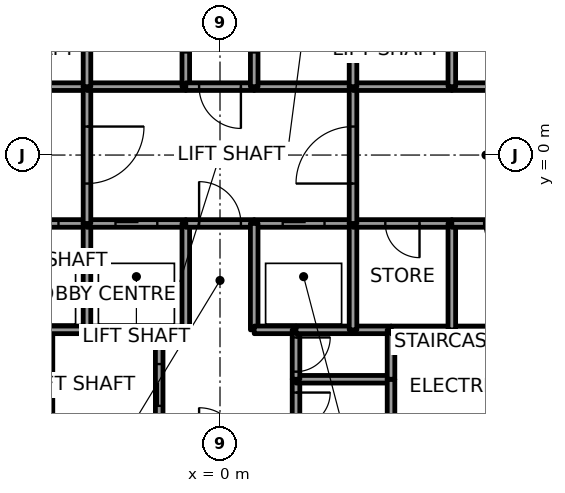
"""IFC4 building model, lengths in metres.
Left out: names, types, materials, properties, quantities, classifications, styles, units other than length and angle.
Written with IfcOpenShell. Run it as: python <this file> out.ifc"""

import sys

from ifc_helpers import new_model, si_unit, direction, frame, frame_2d, origin, place, context, subcontext, project, spatial, rectangle, extrude, element, fill, save


model = new_model("IFC4")
c1 = context("Model", 3, precision=1e-05, world=origin(), true_north=direction((0.0, 1.0)))
c2 = subcontext(c1, "Body", "Model", "MODEL_VIEW")
j1 = project(units=[si_unit("LENGTHUNIT", "METRE"), si_unit("PLANEANGLEUNIT", "RADIAN")], contexts=[c1])
p1 = place(None, origin())
s1 = spatial("IfcSite", under=j1, at=p1, CompositionType="ELEMENT")
p2 = place(p1, origin())
s2 = spatial("IfcBuilding", under=s1, at=p2, CompositionType="ELEMENT")
p3 = place(p2, frame((0.0, 0.0, 28.8)))
s3 = spatial("IfcBuildingStorey", under=s2, at=p3, CompositionType="ELEMENT", Elevation=28.8)
p4 = place(p3, frame((-6.1, -1.8, 0.0), z_axis=(0.0, 0.0, 1.0), x_axis=(1.0, 0.0, 0.0)))
e1 = element("IfcWall", 1, at=p4, inside=s3, PredefinedType="SOLIDWALL", context=c2, shape_type="SweptSolid", body=[
    extrude(rectangle(XDim=2.6, YDim=0.2, at=frame_2d((1.3, 0.0))), origin(), (0.0, 0.0, 1.0), 5.0),
])
p5 = place(p4, frame((0.75, 0.0, 0.0)))
e2 = element("IfcOpeningElement", 2, at=p5, cuts=e1, PredefinedType="OPENING", context=c2, shape_type="SweptSolid", body=[
    extrude(rectangle(XDim=1.1, YDim=2.1, at=frame_2d((0.55, 1.05))), frame((0.0, 0.1, 0.0), z_axis=(0.0, -1.0, 0.0), x_axis=(1.0, 0.0, 0.0)), (0.0, 0.0, 1.0), 0.2),
])
p6 = place(p3, frame((-3.5, 1.8, 0.0), z_axis=(0.0, 0.0, 1.0), x_axis=(-1.0, 0.0, 0.0)))
e3 = element("IfcWall", 3, at=p6, inside=s3, PredefinedType="SOLIDWALL", context=c2, shape_type="SweptSolid", body=[
    extrude(rectangle(XDim=2.6, YDim=0.2, at=frame_2d((1.3, 0.0))), origin(), (0.0, 0.0, 1.0), 5.0),
])
p7 = place(p3, frame((-4.5, -4.6, 0.0), z_axis=(0.0, 0.0, 1.0), x_axis=(1.0, 0.0, 0.0)))
e4 = element("IfcWall", 4, at=p7, inside=s3, PredefinedType="SOLIDWALL", context=c2, shape_type="SweptSolid", body=[
    extrude(rectangle(XDim=1.0, YDim=0.2, at=frame_2d((0.5, 0.0))), origin(), (0.0, 0.0, 1.0), 5.0),
])
p8 = place(p3, frame((-3.5, -4.6, 0.0), z_axis=(0.0, 0.0, 1.0), x_axis=(1.0, 0.0, 0.0)))
e5 = element("IfcWall", 5, at=p8, inside=s3, PredefinedType="SOLIDWALL", context=c2, shape_type="SweptSolid", body=[
    extrude(rectangle(XDim=1.9, YDim=0.2, at=frame_2d((0.95, 0.0))), origin(), (0.0, 0.0, 1.0), 5.0),
])
p9 = place(p3, frame((-3.5, -4.6, 0.0), z_axis=(0.0, 0.0, 1.0), x_axis=(0.0, 1.0, 0.0)))
e6 = element("IfcWall", 6, at=p9, inside=s3, PredefinedType="SOLIDWALL", context=c2, shape_type="SweptSolid", body=[
    extrude(rectangle(XDim=2.8, YDim=0.2, at=frame_2d((1.4, 0.0))), origin(), (0.0, 0.0, 1.0), 5.0),
])
p10 = place(p3, frame((-3.5, -1.8, 0.0), z_axis=(0.0, 0.0, 1.0), x_axis=(1.0, 0.0, 0.0)))
e7 = element("IfcWall", 7, at=p10, inside=s3, PredefinedType="SOLIDWALL", context=c2, shape_type="SweptSolid", body=[
    extrude(rectangle(XDim=2.6, YDim=0.2, at=frame_2d((1.3, 0.0))), origin(), (0.0, 0.0, 1.0), 5.0),
])
p11 = place(p10, frame((0.75, 0.0, 0.0)))
e8 = element("IfcOpeningElement", 8, at=p11, cuts=e7, PredefinedType="OPENING", context=c2, shape_type="SweptSolid", body=[
    extrude(rectangle(XDim=1.1, YDim=2.1, at=frame_2d((0.55, 1.05))), frame((0.0, 0.1, 0.0), z_axis=(0.0, -1.0, 0.0), x_axis=(1.0, 0.0, 0.0)), (0.0, 0.0, 1.0), 0.2),
])
p12 = place(p3, frame((-3.5, 1.8, 0.0), z_axis=(0.0, 0.0, 1.0), x_axis=(0.0, -1.0, 0.0)))
e9 = element("IfcWall", 9, at=p12, inside=s3, PredefinedType="SOLIDWALL", context=c2, shape_type="SweptSolid", body=[
    extrude(rectangle(XDim=3.6, YDim=0.2, at=frame_2d((1.8, 0.0))), origin(), (0.0, 0.0, 1.0), 5.0),
])
p13 = place(p12, frame((1.05, 0.0, 0.0)))
e10 = element("IfcOpeningElement", 10, at=p13, cuts=e9, PredefinedType="OPENING", context=c2, shape_type="SweptSolid", body=[
    extrude(rectangle(XDim=1.5, YDim=2.4, at=frame_2d((0.75, 1.2))), frame((0.0, 0.1, 0.0), z_axis=(0.0, -1.0, 0.0), x_axis=(1.0, 0.0, 0.0)), (0.0, 0.0, 1.0), 0.2),
])
p14 = place(p3, frame((-0.9, 1.8, 0.0), z_axis=(0.0, 0.0, 1.0), x_axis=(-1.0, 0.0, 0.0)))
e11 = element("IfcWall", 11, at=p14, inside=s3, PredefinedType="SOLIDWALL", context=c2, shape_type="SweptSolid", body=[
    extrude(rectangle(XDim=2.6, YDim=0.2, at=frame_2d((1.3, 0.0))), origin(), (0.0, 0.0, 1.0), 5.0),
])
p15 = place(p3, frame((-3.5, 4.6, 0.0), z_axis=(0.0, 0.0, 1.0), x_axis=(0.0, -1.0, 0.0)))
e12 = element("IfcWall", 12, at=p15, inside=s3, PredefinedType="SOLIDWALL", context=c2, shape_type="SweptSolid", body=[
    extrude(rectangle(XDim=2.8, YDim=0.2, at=frame_2d((1.4, 0.0))), origin(), (0.0, 0.0, 1.0), 5.0),
])
p16 = place(p3, frame((-0.9, 1.8, 0.0), z_axis=(0.0, 0.0, 1.0), x_axis=(0.0, 1.0, 0.0)))
e13 = element("IfcWall", 13, at=p16, inside=s3, PredefinedType="SOLIDWALL", context=c2, shape_type="SweptSolid", body=[
    extrude(rectangle(XDim=3.0, YDim=0.2, at=frame_2d((1.5, 0.0))), origin(), (0.0, 0.0, 1.0), 5.0),
])
p17 = place(p16, frame((0.9, 0.0, 0.0)))
e14 = element("IfcOpeningElement", 14, at=p17, cuts=e13, PredefinedType="OPENING", context=c2, shape_type="SweptSolid", body=[
    extrude(rectangle(XDim=1.2, YDim=2.1, at=frame_2d((0.6, 1.05))), frame((0.0, 0.1, 0.0), z_axis=(0.0, -1.0, 0.0), x_axis=(1.0, 0.0, 0.0)), (0.0, 0.0, 1.0), 0.2),
])
p18 = place(p3, frame((-1.6, -7.5, 0.0), z_axis=(0.0, 0.0, 1.0), x_axis=(0.0, 1.0, 0.0)))
e15 = element("IfcWall", 15, at=p18, inside=s3, PredefinedType="SOLIDWALL", context=c2, shape_type="SweptSolid", body=[
    extrude(rectangle(XDim=2.9, YDim=0.2, at=frame_2d((1.45, 0.0))), origin(), (0.0, 0.0, 1.0), 5.0),
])
p19 = place(p18, frame((0.9, 0.0, 0.0)))
e16 = element("IfcOpeningElement", 16, at=p19, cuts=e15, PredefinedType="OPENING", context=c2, shape_type="SweptSolid", body=[
    extrude(rectangle(XDim=1.1, YDim=2.1, at=frame_2d((0.55, 1.05))), frame((0.0, 0.1, 0.0), z_axis=(0.0, -1.0, 0.0), x_axis=(1.0, 0.0, 0.0)), (0.0, 0.0, 1.0), 0.2),
])
p20 = place(p3, frame((-1.6, -4.6, 0.0), z_axis=(0.0, 0.0, 1.0), x_axis=(1.0, 0.0, 0.0)))
e17 = element("IfcWall", 17, at=p20, inside=s3, PredefinedType="SOLIDWALL", context=c2, shape_type="SweptSolid", body=[
    extrude(rectangle(XDim=0.7, YDim=0.2, at=frame_2d((0.35, 0.0))), origin(), (0.0, 0.0, 1.0), 5.0),
])
p21 = place(p3, frame((-0.9, -4.6, 0.0), z_axis=(0.0, 0.0, 1.0), x_axis=(0.0, 1.0, 0.0)))
e18 = element("IfcWall", 18, at=p21, inside=s3, PredefinedType="SOLIDWALL", context=c2, shape_type="SweptSolid", body=[
    extrude(rectangle(XDim=2.8, YDim=0.2, at=frame_2d((1.4, 0.0))), origin(), (0.0, 0.0, 1.0), 5.0),
])
p22 = place(p3, frame((-0.9, -1.8, 0.0), z_axis=(0.0, 0.0, 1.0), x_axis=(1.0, 0.0, 0.0)))
e19 = element("IfcWall", 19, at=p22, inside=s3, PredefinedType="SOLIDWALL", context=c2, shape_type="SweptSolid", body=[
    extrude(rectangle(XDim=1.8, YDim=0.2, at=frame_2d((0.9, 0.0))), origin(), (0.0, 0.0, 1.0), 5.0),
])
p23 = place(p22, frame((0.35, 0.0, 0.0)))
e20 = element("IfcOpeningElement", 20, at=p23, cuts=e19, PredefinedType="OPENING", context=c2, shape_type="SweptSolid", body=[
    extrude(rectangle(XDim=1.1, YDim=2.4, at=frame_2d((0.55, 1.2))), frame((0.0, 0.1, 0.0), z_axis=(0.0, -1.0, 0.0), x_axis=(1.0, 0.0, 0.0)), (0.0, 0.0, 1.0), 0.2),
])
p24 = place(p3, frame((0.9, 1.8, 0.0), z_axis=(0.0, 0.0, 1.0), x_axis=(-1.0, 0.0, 0.0)))
e21 = element("IfcWall", 21, at=p24, inside=s3, PredefinedType="SOLIDWALL", context=c2, shape_type="SweptSolid", body=[
    extrude(rectangle(XDim=1.8, YDim=0.2, at=frame_2d((0.9, 0.0))), origin(), (0.0, 0.0, 1.0), 5.0),
])
p25 = place(p24, frame((0.35, 0.0, 0.0)))
e22 = element("IfcOpeningElement", 22, at=p25, cuts=e21, PredefinedType="OPENING", context=c2, shape_type="SweptSolid", body=[
    extrude(rectangle(XDim=1.1, YDim=2.4, at=frame_2d((0.55, 1.2))), frame((0.0, 0.1, 0.0), z_axis=(0.0, -1.0, 0.0), x_axis=(1.0, 0.0, 0.0)), (0.0, 0.0, 1.0), 0.2),
])
p26 = place(p3, frame((0.9, -1.8, 0.0), z_axis=(0.0, 0.0, 1.0), x_axis=(1.0, 0.0, 0.0)))
e23 = element("IfcWall", 23, at=p26, inside=s3, PredefinedType="SOLIDWALL", context=c2, shape_type="SweptSolid", body=[
    extrude(rectangle(XDim=2.6, YDim=0.2, at=frame_2d((1.3, 0.0))), origin(), (0.0, 0.0, 1.0), 5.0),
])
p27 = place(p26, frame((0.75, 0.0, 0.0)))
e24 = element("IfcOpeningElement", 24, at=p27, cuts=e23, PredefinedType="OPENING", context=c2, shape_type="SweptSolid", body=[
    extrude(rectangle(XDim=1.1, YDim=2.1, at=frame_2d((0.55, 1.05))), frame((0.0, 0.1, 0.0), z_axis=(0.0, -1.0, 0.0), x_axis=(1.0, 0.0, 0.0)), (0.0, 0.0, 1.0), 0.2),
])
p28 = place(p3, frame((0.9, -1.8, 0.0), z_axis=(0.0, 0.0, 1.0), x_axis=(0.0, -1.0, 0.0)))
e25 = element("IfcWall", 25, at=p28, inside=s3, PredefinedType="SOLIDWALL", context=c2, shape_type="SweptSolid", body=[
    extrude(rectangle(XDim=2.8, YDim=0.2, at=frame_2d((1.4, 0.0))), origin(), (0.0, 0.0, 1.0), 5.0),
])
p29 = place(p3, frame((0.9, -4.6, 0.0), z_axis=(0.0, 0.0, 1.0), x_axis=(1.0, 0.0, 0.0)))
e26 = element("IfcWall", 26, at=p29, inside=s3, PredefinedType="SOLIDWALL", context=c2, shape_type="SweptSolid", body=[
    extrude(rectangle(XDim=1.1, YDim=0.2, at=frame_2d((0.55, 0.0))), origin(), (0.0, 0.0, 1.0), 5.0),
])
p30 = place(p3, frame((3.5, 1.8, 0.0), z_axis=(0.0, 0.0, 1.0), x_axis=(-1.0, 0.0, 0.0)))
e27 = element("IfcWall", 27, at=p30, inside=s3, PredefinedType="SOLIDWALL", context=c2, shape_type="SweptSolid", body=[
    extrude(rectangle(XDim=2.6, YDim=0.2, at=frame_2d((1.3, 0.0))), origin(), (0.0, 0.0, 1.0), 5.0),
])
p31 = place(p3, frame((0.9, 4.8, 0.0), z_axis=(0.0, 0.0, 1.0), x_axis=(0.0, -1.0, 0.0)))
e28 = element("IfcWall", 28, at=p31, inside=s3, PredefinedType="SOLIDWALL", context=c2, shape_type="SweptSolid", body=[
    extrude(rectangle(XDim=3.0, YDim=0.2, at=frame_2d((1.5, 0.0))), origin(), (0.0, 0.0, 1.0), 5.0),
])
p32 = place(p31, frame((0.9, 0.0, 0.0)))
e29 = element("IfcOpeningElement", 29, at=p32, cuts=e28, PredefinedType="OPENING", context=c2, shape_type="SweptSolid", body=[
    extrude(rectangle(XDim=1.2, YDim=2.1, at=frame_2d((0.6, 1.05))), frame((0.0, 0.1, 0.0), z_axis=(0.0, -1.0, 0.0), x_axis=(1.0, 0.0, 0.0)), (0.0, 0.0, 1.0), 0.2),
])
p33 = place(p3, frame((2.0, -5.9, 0.0), z_axis=(0.0, 0.0, 1.0), x_axis=(0.0, -1.0, 0.0)))
e30 = element("IfcWall", 30, at=p33, inside=s3, PredefinedType="SOLIDWALL", context=c2, shape_type="SweptSolid", body=[
    extrude(rectangle(XDim=1.6, YDim=0.2, at=frame_2d((0.8, 0.0))), origin(), (0.0, 0.0, 1.0), 5.0),
])
p34 = place(p33, frame((0.35, 0.0, 0.0)))
e31 = element("IfcOpeningElement", 31, at=p34, cuts=e30, PredefinedType="OPENING", context=c2, shape_type="SweptSolid", body=[
    extrude(rectangle(XDim=0.9, YDim=2.4, at=frame_2d((0.45, 1.2))), frame((0.0, 0.1, 0.0), z_axis=(0.0, -1.0, 0.0), x_axis=(1.0, 0.0, 0.0)), (0.0, 0.0, 1.0), 0.2),
])
p35 = place(p3, frame((4.5, -5.9, 0.0), z_axis=(0.0, 0.0, 1.0), x_axis=(-1.0, 0.0, 0.0)))
e32 = element("IfcWall", 32, at=p35, inside=s3, PredefinedType="SOLIDWALL", context=c2, shape_type="SweptSolid", body=[
    extrude(rectangle(XDim=2.5, YDim=0.2, at=frame_2d((1.25, 0.0))), origin(), (0.0, 0.0, 1.0), 5.0),
])
p36 = place(p3, frame((2.0, -4.6, 0.0), z_axis=(0.0, 0.0, 1.0), x_axis=(0.0, -1.0, 0.0)))
e33 = element("IfcWall", 33, at=p36, inside=s3, PredefinedType="SOLIDWALL", context=c2, shape_type="SweptSolid", body=[
    extrude(rectangle(XDim=1.3, YDim=0.2, at=frame_2d((0.65, 0.0))), origin(), (0.0, 0.0, 1.0), 5.0),
])
p37 = place(p36, frame((0.2, 0.0, 0.0)))
e34 = element("IfcOpeningElement", 34, at=p37, cuts=e33, PredefinedType="OPENING", context=c2, shape_type="SweptSolid", body=[
    extrude(rectangle(XDim=0.9, YDim=2.4, at=frame_2d((0.45, 1.2))), frame((0.0, 0.1, 0.0), z_axis=(0.0, -1.0, 0.0), x_axis=(1.0, 0.0, 0.0)), (0.0, 0.0, 1.0), 0.2),
])
p38 = place(p3, frame((3.5, -4.6, 0.0), z_axis=(0.0, 0.0, 1.0), x_axis=(-1.0, 0.0, 0.0)))
e35 = element("IfcWall", 35, at=p38, inside=s3, PredefinedType="SOLIDWALL", context=c2, shape_type="SweptSolid", body=[
    extrude(rectangle(XDim=1.5, YDim=0.2, at=frame_2d((0.75, 0.0))), origin(), (0.0, 0.0, 1.0), 5.0),
])
p39 = place(p3, frame((3.5, -4.6, 0.0), z_axis=(0.0, 0.0, 1.0), x_axis=(1.0, 0.0, 0.0)))
e36 = element("IfcWall", 36, at=p39, inside=s3, PredefinedType="SOLIDWALL", context=c2, shape_type="SweptSolid", body=[
    extrude(rectangle(XDim=1.0, YDim=0.2, at=frame_2d((0.5, 0.0))), origin(), (0.0, 0.0, 1.0), 5.0),
])
p40 = place(p3, frame((3.5, -1.8, 0.0), z_axis=(0.0, 0.0, 1.0), x_axis=(0.0, -1.0, 0.0)))
e37 = element("IfcWall", 37, at=p40, inside=s3, PredefinedType="SOLIDWALL", context=c2, shape_type="SweptSolid", body=[
    extrude(rectangle(XDim=2.8, YDim=0.2, at=frame_2d((1.4, 0.0))), origin(), (0.0, 0.0, 1.0), 5.0),
])
p41 = place(p3, frame((6.1, -1.8, 0.0), z_axis=(0.0, 0.0, 1.0), x_axis=(-1.0, 0.0, 0.0)))
e38 = element("IfcWall", 38, at=p41, inside=s3, PredefinedType="SOLIDWALL", context=c2, shape_type="SweptSolid", body=[
    extrude(rectangle(XDim=2.6, YDim=0.2, at=frame_2d((1.3, 0.0))), origin(), (0.0, 0.0, 1.0), 5.0),
])
p42 = place(p41, frame((0.85, 0.0, 0.0)))
e39 = element("IfcOpeningElement", 39, at=p42, cuts=e38, PredefinedType="OPENING", context=c2, shape_type="SweptSolid", body=[
    extrude(rectangle(XDim=0.9, YDim=2.4, at=frame_2d((0.45, 1.2))), frame((0.0, 0.1, 0.0), z_axis=(0.0, -1.0, 0.0), x_axis=(1.0, 0.0, 0.0)), (0.0, 0.0, 1.0), 0.2),
])
p43 = place(p3, frame((3.5, -1.8, 0.0), z_axis=(0.0, 0.0, 1.0), x_axis=(0.0, 1.0, 0.0)))
e40 = element("IfcWall", 40, at=p43, inside=s3, PredefinedType="SOLIDWALL", context=c2, shape_type="SweptSolid", body=[
    extrude(rectangle(XDim=3.6, YDim=0.2, at=frame_2d((1.8, 0.0))), origin(), (0.0, 0.0, 1.0), 5.0),
])
p44 = place(p43, frame((1.05, 0.0, 0.0)))
e41 = element("IfcOpeningElement", 41, at=p44, cuts=e40, PredefinedType="OPENING", context=c2, shape_type="SweptSolid", body=[
    extrude(rectangle(XDim=1.5, YDim=2.4, at=frame_2d((0.75, 1.2))), frame((0.0, 0.1, 0.0), z_axis=(0.0, -1.0, 0.0), x_axis=(1.0, 0.0, 0.0)), (0.0, 0.0, 1.0), 0.2),
])
p45 = place(p3, frame((6.1, 1.8, 0.0), z_axis=(0.0, 0.0, 1.0), x_axis=(-1.0, 0.0, 0.0)))
e42 = element("IfcWall", 42, at=p45, inside=s3, PredefinedType="SOLIDWALL", context=c2, shape_type="SweptSolid", body=[
    extrude(rectangle(XDim=2.6, YDim=0.2, at=frame_2d((1.3, 0.0))), origin(), (0.0, 0.0, 1.0), 5.0),
])
p46 = place(p3, frame((3.5, 1.8, 0.0), z_axis=(0.0, 0.0, 1.0), x_axis=(0.0, 1.0, 0.0)))
e43 = element("IfcWall", 43, at=p46, inside=s3, PredefinedType="SOLIDWALL", context=c2, shape_type="SweptSolid", body=[
    extrude(rectangle(XDim=2.8, YDim=0.2, at=frame_2d((1.4, 0.0))), origin(), (0.0, 0.0, 1.0), 5.0),
])
p47 = place(p3, frame((4.5, -7.5, 0.0), z_axis=(0.0, 0.0, 1.0), x_axis=(0.0, 1.0, 0.0)))
e44 = element("IfcWall", 44, at=p47, inside=s3, PredefinedType="SOLIDWALL", context=c2, shape_type="SweptSolid", body=[
    extrude(rectangle(XDim=1.6, YDim=0.2, at=frame_2d((0.8, 0.0))), origin(), (0.0, 0.0, 1.0), 5.0),
])
p48 = place(p3, frame((4.5, -5.9, 0.0), z_axis=(0.0, 0.0, 1.0), x_axis=(0.0, 1.0, 0.0)))
e45 = element("IfcWall", 45, at=p48, inside=s3, PredefinedType="SOLIDWALL", context=c2, shape_type="SweptSolid", body=[
    extrude(rectangle(XDim=1.3, YDim=0.2, at=frame_2d((0.65, 0.0))), origin(), (0.0, 0.0, 1.0), 5.0),
])
p49 = place(p3, frame((4.5, -4.6, 0.0), z_axis=(0.0, 0.0, 1.0), x_axis=(1.0, 0.0, 0.0)))
e46 = element("IfcWall", 46, at=p49, inside=s3, PredefinedType="SOLIDWALL", context=c2, shape_type="SweptSolid", body=[
    extrude(rectangle(XDim=1.6, YDim=0.2, at=frame_2d((0.8, 0.0))), origin(), (0.0, 0.0, 1.0), 5.0),
])
p50 = place(p3, frame((6.1, -4.6, 0.0), z_axis=(0.0, 0.0, 1.0), x_axis=(1.0, 0.0, 0.0)))
e47 = element("IfcWall", 47, at=p50, inside=s3, PredefinedType="SOLIDWALL", context=c2, shape_type="SweptSolid", body=[
    extrude(rectangle(XDim=2.6, YDim=0.2, at=frame_2d((1.3, 0.0))), origin(), (0.0, 0.0, 1.0), 5.0),
])
p51 = place(p3, frame((6.1, -4.6, 0.0), z_axis=(0.0, 0.0, 1.0), x_axis=(0.0, 1.0, 0.0)))
e48 = element("IfcWall", 48, at=p51, inside=s3, PredefinedType="SOLIDWALL", context=c2, shape_type="SweptSolid", body=[
    extrude(rectangle(XDim=2.8, YDim=0.2, at=frame_2d((1.4, 0.0))), origin(), (0.0, 0.0, 1.0), 5.0),
])
p52 = place(p3, frame((8.7, -1.8, 0.0), z_axis=(0.0, 0.0, 1.0), x_axis=(-1.0, 0.0, 0.0)))
e49 = element("IfcWall", 49, at=p52, inside=s3, PredefinedType="SOLIDWALL", context=c2, shape_type="SweptSolid", body=[
    extrude(rectangle(XDim=2.6, YDim=0.2, at=frame_2d((1.3, 0.0))), origin(), (0.0, 0.0, 1.0), 5.0),
])
p53 = place(p52, frame((0.85, 0.0, 0.0)))
e50 = element("IfcOpeningElement", 50, at=p53, cuts=e49, PredefinedType="OPENING", context=c2, shape_type="SweptSolid", body=[
    extrude(rectangle(XDim=0.9, YDim=2.4, at=frame_2d((0.45, 1.2))), frame((0.0, 0.1, 0.0), z_axis=(0.0, -1.0, 0.0), x_axis=(1.0, 0.0, 0.0)), (0.0, 0.0, 1.0), 0.2),
])
p54 = place(p3, frame((8.7, 1.8, 0.0), z_axis=(0.0, 0.0, 1.0), x_axis=(-1.0, 0.0, 0.0)))
e51 = element("IfcWall", 51, at=p54, inside=s3, PredefinedType="SOLIDWALL", context=c2, shape_type="SweptSolid", body=[
    extrude(rectangle(XDim=2.6, YDim=0.2, at=frame_2d((1.3, 0.0))), origin(), (0.0, 0.0, 1.0), 5.0),
])
p55 = place(p3, frame((6.1, 1.8, 0.0), z_axis=(0.0, 0.0, 1.0), x_axis=(0.0, 1.0, 0.0)))
e52 = element("IfcWall", 52, at=p55, inside=s3, PredefinedType="SOLIDWALL", context=c2, shape_type="SweptSolid", body=[
    extrude(rectangle(XDim=2.8, YDim=0.2, at=frame_2d((1.4, 0.0))), origin(), (0.0, 0.0, 1.0), 5.0),
])
p56 = place(p5, origin())
e53 = element("IfcDoor", 53, at=p56, inside=s3, OperationType="SLIDING_TO_RIGHT", PredefinedType="DOOR", context=c2, shape_type="SweptSolid", body=[
    extrude(rectangle(XDim=1.1, YDim=2.1, at=frame_2d((0.55, 1.05))), frame((0.0, 0.025, 0.0), z_axis=(0.0, -1.0, 0.0), x_axis=(1.0, 0.0, 0.0)), (0.0, 0.0, 1.0), 0.05),
])
fill(e2, e53)
p57 = place(p11, origin())
e54 = element("IfcDoor", 54, at=p57, inside=s3, OperationType="SLIDING_TO_RIGHT", PredefinedType="DOOR", context=c2, shape_type="SweptSolid", body=[
    extrude(rectangle(XDim=1.1, YDim=2.1, at=frame_2d((0.55, 1.05))), frame((0.0, 0.025, 0.0), z_axis=(0.0, -1.0, 0.0), x_axis=(1.0, 0.0, 0.0)), (0.0, 0.0, 1.0), 0.05),
])
fill(e8, e54)
p58 = place(p27, origin())
e55 = element("IfcDoor", 55, at=p58, inside=s3, OperationType="SLIDING_TO_LEFT", PredefinedType="DOOR", context=c2, shape_type="SweptSolid", body=[
    extrude(rectangle(XDim=1.1, YDim=2.1, at=frame_2d((0.55, 1.05))), frame((0.0, 0.025, 0.0), z_axis=(0.0, -1.0, 0.0), x_axis=(1.0, 0.0, 0.0)), (0.0, 0.0, 1.0), 0.05),
])
fill(e24, e55)
p59 = place(p19, origin())
e56 = element("IfcDoor", 56, at=p59, inside=s3, OperationType="SLIDING_TO_RIGHT", PredefinedType="DOOR", context=c2, shape_type="SweptSolid", body=[
    extrude(rectangle(XDim=1.1, YDim=2.1, at=frame_2d((0.55, 1.05))), frame((0.0, 0.025, 0.0), z_axis=(0.0, -1.0, 0.0), x_axis=(1.0, 0.0, 0.0)), (0.0, 0.0, 1.0), 0.05),
])
fill(e16, e56)
p60 = place(p13, origin())
e57 = element("IfcDoor", 57, at=p60, inside=s3, OperationType="DOUBLE_DOOR_SINGLE_SWING", PredefinedType="DOOR", context=c2, shape_type="SweptSolid", body=[
    extrude(rectangle(XDim=1.5, YDim=2.4, at=frame_2d((0.75, 1.2))), frame((0.0, 0.025, 0.0), z_axis=(0.0, -1.0, 0.0), x_axis=(1.0, 0.0, 0.0)), (0.0, 0.0, 1.0), 0.05),
])
fill(e10, e57)
p61 = place(p44, origin())
e58 = element("IfcDoor", 58, at=p61, inside=s3, OperationType="DOUBLE_DOOR_SINGLE_SWING", PredefinedType="DOOR", context=c2, shape_type="SweptSolid", body=[
    extrude(rectangle(XDim=1.5, YDim=2.4, at=frame_2d((0.75, 1.2))), frame((0.0, 0.025, 0.0), z_axis=(0.0, -1.0, 0.0), x_axis=(1.0, 0.0, 0.0)), (0.0, 0.0, 1.0), 0.05),
])
fill(e41, e58)
p62 = place(p25, origin())
e59 = element("IfcDoor", 59, at=p62, inside=s3, OperationType="SINGLE_SWING_LEFT", PredefinedType="DOOR", context=c2, shape_type="SweptSolid", body=[
    extrude(rectangle(XDim=1.1, YDim=2.4, at=frame_2d((0.55, 1.2))), frame((0.0, 0.025, 0.0), z_axis=(0.0, -1.0, 0.0), x_axis=(1.0, 0.0, 0.0)), (0.0, 0.0, 1.0), 0.05),
])
fill(e22, e59)
p63 = place(p23, origin())
e60 = element("IfcDoor", 60, at=p63, inside=s3, OperationType="SINGLE_SWING_RIGHT", PredefinedType="DOOR", context=c2, shape_type="SweptSolid", body=[
    extrude(rectangle(XDim=1.1, YDim=2.4, at=frame_2d((0.55, 1.2))), frame((0.0, 0.025, 0.0), z_axis=(0.0, -1.0, 0.0), x_axis=(1.0, 0.0, 0.0)), (0.0, 0.0, 1.0), 0.05),
])
fill(e20, e60)
p64 = place(p42, origin())
e61 = element("IfcDoor", 61, at=p64, inside=s3, OperationType="SINGLE_SWING_RIGHT", PredefinedType="DOOR", context=c2, shape_type="SweptSolid", body=[
    extrude(rectangle(XDim=0.9, YDim=2.4, at=frame_2d((0.45, 1.2))), frame((0.0, 0.025, 0.0), z_axis=(0.0, -1.0, 0.0), x_axis=(1.0, 0.0, 0.0)), (0.0, 0.0, 1.0), 0.05),
])
fill(e39, e61)
p65 = place(p53, origin())
e62 = element("IfcDoor", 62, at=p65, inside=s3, OperationType="SINGLE_SWING_LEFT", PredefinedType="DOOR", context=c2, shape_type="SweptSolid", body=[
    extrude(rectangle(XDim=0.9, YDim=2.4, at=frame_2d((0.45, 1.2))), frame((0.0, 0.025, 0.0), z_axis=(0.0, -1.0, 0.0), x_axis=(1.0, 0.0, 0.0)), (0.0, 0.0, 1.0), 0.05),
])
fill(e50, e62)
p66 = place(p34, origin())
e63 = element("IfcDoor", 63, at=p66, inside=s3, OperationType="SINGLE_SWING_LEFT", PredefinedType="DOOR", context=c2, shape_type="SweptSolid", body=[
    extrude(rectangle(XDim=0.9, YDim=2.4, at=frame_2d((0.45, 1.2))), frame((0.0, 0.025, 0.0), z_axis=(0.0, -1.0, 0.0), x_axis=(1.0, 0.0, 0.0)), (0.0, 0.0, 1.0), 0.05),
])
fill(e31, e63)
p67 = place(p37, origin())
e64 = element("IfcDoor", 64, at=p67, inside=s3, OperationType="SINGLE_SWING_RIGHT", PredefinedType="DOOR", context=c2, shape_type="SweptSolid", body=[
    extrude(rectangle(XDim=0.9, YDim=2.4, at=frame_2d((0.45, 1.2))), frame((0.0, 0.025, 0.0), z_axis=(0.0, -1.0, 0.0), x_axis=(1.0, 0.0, 0.0)), (0.0, 0.0, 1.0), 0.05),
])
fill(e34, e64)
save(model, sys.argv[1])
